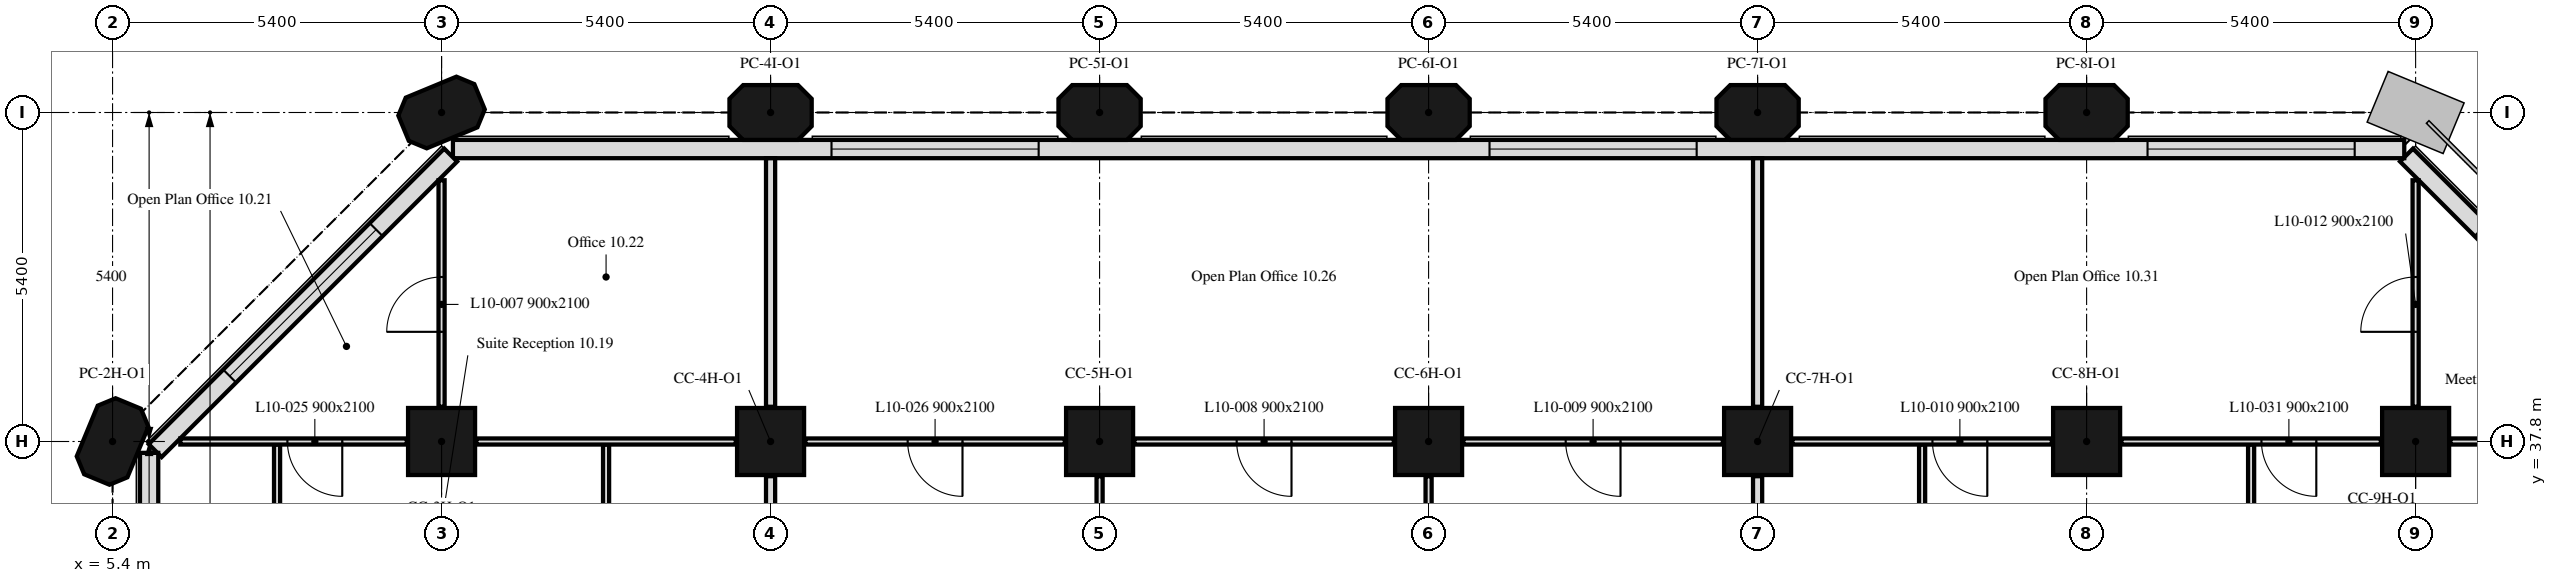
"""IFC4 building model, lengths in metres.
Left out: names, types, materials, properties, quantities, classifications, styles, units other than length and angle.
Written with IfcOpenShell. Run it as: python <this file> out.ifc"""

import sys

from ifc_helpers import new_model, si_unit, direction, frame, frame_2d, origin, origin_2d, place, context, subcontext, project, spatial, polyline, rectangle, outline, extrude, element, fill, save


model = new_model("IFC4")
c1 = context("Model", 3, precision=1e-05, world=origin(), true_north=direction((0.0, 1.0)))
c2 = subcontext(c1, "Body", "Model", "MODEL_VIEW")
j1 = project(units=[si_unit("LENGTHUNIT", "METRE"), si_unit("PLANEANGLEUNIT", "RADIAN")], contexts=[c1])
p1 = place(None, origin())
s1 = spatial("IfcSite", under=j1, at=p1, CompositionType="ELEMENT")
p2 = place(p1, origin())
s2 = spatial("IfcBuilding", under=s1, at=p2, CompositionType="ELEMENT")
p3 = place(p2, frame((0.0, 0.0, 48.8)))
s3 = spatial("IfcBuildingStorey", under=s2, at=p3, CompositionType="ELEMENT", Elevation=48.8)
p4 = place(p3, frame((5.4, 37.8, 0.0), z_axis=(0.0, 0.0, 1.0), x_axis=(0.382683432365, 0.923879532511, 0.0)))
e1 = element("IfcColumn", 1, at=p4, inside=s3, PredefinedType="COLUMN", context=c2, shape_type="SweptSolid", body=[
    extrude(outline(polyline([(-0.45, -0.45), (0.45, -0.45), (0.675, -0.225), (0.675, 0.225), (0.45, 0.45), (-0.45, 0.45), (-0.675, 0.225), (-0.675, -0.225), (-0.45, -0.45)])), origin(), (0.0, 0.0, 1.0), 3.5),
])
for number, where, z_axis, x_axis in (
    (2, (10.8, 37.8, 0.0), (0.0, 0.0, 1.0), (1.0, 0.0, 0.0)),
    (3, (16.2, 37.8, 0.0), (0.0, 0.0, 1.0), (1.0, 0.0, 0.0)),
    (4, (21.6, 37.8, 0.0), (0.0, 0.0, 1.0), (1.0, 0.0, 0.0)),
    (5, (27.0, 37.8, 0.0), (0.0, 0.0, 1.0), (1.0, 0.0, 0.0)),
    (6, (32.4, 37.8, 0.0), (0.0, 0.0, 1.0), (1.0, 0.0, 0.0)),
    (7, (37.8, 37.8, 0.0), (0.0, 0.0, 1.0), (1.0, 0.0, 0.0)),
    (8, (43.2, 37.8, 0.0), (0.0, 0.0, 1.0), (1.0, 0.0, 0.0)),
):
    element("IfcColumn", number, at=place(p3, frame(where, z_axis=z_axis, x_axis=x_axis)), inside=s3, PredefinedType="COLUMN", context=c2, shape_type="SweptSolid", body=[
        extrude(rectangle(XDim=1.1, YDim=1.1, at=origin_2d()), origin(), (0.0, 0.0, 1.0), 3.5),
    ])
for number, where, z_axis, x_axis in (
    (9, (10.8, 43.2, 0.0), (0.0, 0.0, 1.0), (0.924, 0.383, 0.0)),
    (10, (16.2, 43.2, 0.0), (0.0, 0.0, 1.0), (1.0, 0.0, 0.0)),
    (11, (21.6, 43.2, 0.0), (0.0, 0.0, 1.0), (1.0, 0.0, 0.0)),
    (12, (27.0, 43.2, 0.0), (0.0, 0.0, 1.0), (1.0, 0.0, 0.0)),
    (13, (32.4, 43.2, 0.0), (0.0, 0.0, 1.0), (1.0, 0.0, 0.0)),
    (14, (37.8, 43.2, 0.0), (0.0, 0.0, 1.0), (1.0, 0.0, 0.0)),
):
    element("IfcColumn", number, at=place(p3, frame(where, z_axis=z_axis, x_axis=x_axis)), inside=s3, PredefinedType="COLUMN", context=c2, shape_type="SweptSolid", body=[
        extrude(outline(polyline([(-0.45, -0.45), (0.45, -0.45), (0.675, -0.225), (0.675, 0.225), (0.45, 0.45), (-0.45, 0.45), (-0.675, 0.225), (-0.675, -0.225), (-0.45, -0.45)])), origin(), (0.0, 0.0, 1.0), 3.5),
    ])
p5 = place(p3, frame((47.901, 37.65, 0.0), z_axis=(0.0, 0.0, 1.0), x_axis=(-0.707106781187, 0.707106781187, 0.0)))
e15 = element("IfcWall", 15, at=p5, inside=s3, PredefinedType="SOLIDWALL", context=c2, shape_type="SweptSolid", body=[
    extrude(rectangle(XDim=6.86, YDim=0.3, at=frame_2d((3.43, 0.0))), origin(), (0.0, 0.0, 1.0), 3.5),
])
p6 = place(p5, frame((1.73, 0.0, 0.9)))
e16 = element("IfcOpeningElement", 16, at=p6, cuts=e15, PredefinedType="OPENING", context=c2, shape_type="SweptSolid", body=[
    extrude(rectangle(XDim=3.4, YDim=1.7, at=frame_2d((1.7, 0.85))), frame((0.0, 0.16, 0.0), z_axis=(0.0, -1.0, 0.0), x_axis=(1.0, 0.0, 0.0)), (0.0, 0.0, 1.0), 0.32),
])
p7 = place(p3, frame((43.014, 42.6, 0.0), z_axis=(0.0, 0.0, 1.0), x_axis=(-1.0, 0.0, 0.0)))
e17 = element("IfcWall", 17, at=p7, inside=s3, PredefinedType="SOLIDWALL", context=c2, shape_type="SweptSolid", body=[
    extrude(rectangle(XDim=32.027, YDim=0.3, at=frame_2d((16.014, 0.0))), origin(), (0.0, 0.0, 1.0), 3.5),
])
p8 = place(p7, frame((0.814, 0.0, 0.9)))
e18 = element("IfcOpeningElement", 18, at=p8, cuts=e17, PredefinedType="OPENING", context=c2, shape_type="SweptSolid", body=[
    extrude(rectangle(XDim=3.4, YDim=1.7, at=frame_2d((1.7, 0.85))), frame((0.0, 0.16, 0.0), z_axis=(0.0, -1.0, 0.0), x_axis=(1.0, 0.0, 0.0)), (0.0, 0.0, 1.0), 0.32),
])
p9 = place(p7, frame((11.614, 0.0, 0.9)))
e19 = element("IfcOpeningElement", 19, at=p9, cuts=e17, PredefinedType="OPENING", context=c2, shape_type="SweptSolid", body=[
    extrude(rectangle(XDim=3.4, YDim=1.7, at=frame_2d((1.7, 0.85))), frame((0.0, 0.16, 0.0), z_axis=(0.0, -1.0, 0.0), x_axis=(1.0, 0.0, 0.0)), (0.0, 0.0, 1.0), 0.32),
])
p10 = place(p7, frame((22.414, 0.0, 0.9)))
e20 = element("IfcOpeningElement", 20, at=p10, cuts=e17, PredefinedType="OPENING", context=c2, shape_type="SweptSolid", body=[
    extrude(rectangle(XDim=3.4, YDim=1.7, at=frame_2d((1.7, 0.85))), frame((0.0, 0.16, 0.0), z_axis=(0.0, -1.0, 0.0), x_axis=(1.0, 0.0, 0.0)), (0.0, 0.0, 1.0), 0.32),
])
p11 = place(p3, frame((10.949, 42.501, 0.0), z_axis=(0.0, 0.0, 1.0), x_axis=(-0.707106781187, -0.707106781187, 0.0)))
e21 = element("IfcWall", 21, at=p11, inside=s3, PredefinedType="SOLIDWALL", context=c2, shape_type="SweptSolid", body=[
    extrude(rectangle(XDim=6.86, YDim=0.3, at=frame_2d((3.43, 0.0))), origin(), (0.0, 0.0, 1.0), 3.5),
])
p12 = place(p11, frame((1.73, 0.0, 0.9)))
e22 = element("IfcOpeningElement", 22, at=p12, cuts=e21, PredefinedType="OPENING", context=c2, shape_type="SweptSolid", body=[
    extrude(rectangle(XDim=3.4, YDim=1.7, at=frame_2d((1.7, 0.85))), frame((0.0, 0.16, 0.0), z_axis=(0.0, -1.0, 0.0), x_axis=(1.0, 0.0, 0.0)), (0.0, 0.0, 1.0), 0.32),
])
p13 = place(p3, frame((6.0, 37.614, 0.0), z_axis=(0.0, 0.0, 1.0), x_axis=(0.0, -1.0, 0.0)))
e23 = element("IfcWall", 23, at=p13, inside=s3, PredefinedType="SOLIDWALL", context=c2, shape_type="SweptSolid", body=[
    extrude(rectangle(XDim=5.214, YDim=0.3, at=frame_2d((2.607, 0.0))), origin(), (0.0, 0.0, 1.0), 3.5),
])
p14 = place(p13, frame((1.164, 0.0, 0.9)))
e24 = element("IfcOpeningElement", 24, at=p14, cuts=e23, PredefinedType="OPENING", context=c2, shape_type="SweptSolid", body=[
    extrude(rectangle(XDim=1.1, YDim=1.7, at=frame_2d((0.55, 0.85))), frame((0.0, 0.16, 0.0), z_axis=(0.0, -1.0, 0.0), x_axis=(1.0, 0.0, 0.0)), (0.0, 0.0, 1.0), 0.32),
])
p15 = place(p13, frame((2.764, 0.0, 0.9)))
e25 = element("IfcOpeningElement", 25, at=p15, cuts=e23, PredefinedType="OPENING", context=c2, shape_type="SweptSolid", body=[
    extrude(rectangle(XDim=1.1, YDim=1.7, at=frame_2d((0.55, 0.85))), frame((0.0, 0.16, 0.0), z_axis=(0.0, -1.0, 0.0), x_axis=(1.0, 0.0, 0.0)), (0.0, 0.0, 1.0), 0.32),
])
p16 = place(p3, frame((8.1, 35.175, 0.0), z_axis=(0.0, 0.0, 1.0), x_axis=(0.0, 1.0, 0.0)))
e26 = element("IfcWall", 26, at=p16, inside=s3, PredefinedType="PARTITIONING", context=c2, shape_type="SweptSolid", body=[
    extrude(rectangle(XDim=2.575, YDim=0.1, at=frame_2d((1.288, 0.0))), origin(), (0.0, 0.0, 1.0), 3.5),
])
p17 = place(p3, frame((13.5, 35.175, 0.0), z_axis=(0.0, 0.0, 1.0), x_axis=(0.0, 1.0, 0.0)))
e27 = element("IfcWall", 27, at=p17, inside=s3, PredefinedType="PARTITIONING", context=c2, shape_type="SweptSolid", body=[
    extrude(rectangle(XDim=2.575, YDim=0.1, at=frame_2d((1.288, 0.0))), origin(), (0.0, 0.0, 1.0), 3.5),
])
p18 = place(p17, frame((0.25, 0.0, 0.0)))
e28 = element("IfcOpeningElement", 28, at=p18, cuts=e27, PredefinedType="OPENING", context=c2, shape_type="SweptSolid", body=[
    extrude(rectangle(XDim=0.9, YDim=2.1, at=frame_2d((0.45, 1.05))), frame((0.0, 0.05, 0.0), z_axis=(0.0, -1.0, 0.0), x_axis=(1.0, 0.0, 0.0)), (0.0, 0.0, 1.0), 0.1),
])
p19 = place(p3, frame((10.23, 37.8, 0.0), z_axis=(0.0, 0.0, 1.0), x_axis=(-1.0, 0.0, 0.0)))
e29 = element("IfcWall", 29, at=p19, inside=s3, PredefinedType="PARTITIONING", context=c2, shape_type="SweptSolid", body=[
    extrude(rectangle(XDim=3.718, YDim=0.1, at=frame_2d((1.859, 0.0))), origin(), (0.0, 0.0, 1.0), 3.5),
])
p20 = place(p19, frame((1.06, 0.0, 0.0)))
e30 = element("IfcOpeningElement", 30, at=p20, cuts=e29, PredefinedType="OPENING", context=c2, shape_type="SweptSolid", body=[
    extrude(rectangle(XDim=0.9, YDim=2.1, at=frame_2d((0.45, 1.05))), frame((0.0, 0.05, 0.0), z_axis=(0.0, -1.0, 0.0), x_axis=(1.0, 0.0, 0.0)), (0.0, 0.0, 1.0), 0.1),
])
p21 = place(p3, frame((16.2, 35.175, 0.0), z_axis=(0.0, 0.0, 1.0), x_axis=(0.0, 1.0, 0.0)))
e31 = element("IfcWall", 31, at=p21, inside=s3, PredefinedType="PARTITIONING", context=c2, shape_type="SweptSolid", body=[
    extrude(rectangle(XDim=2.055, YDim=0.15, at=frame_2d((1.027, 0.0))), origin(), (0.0, 0.0, 1.0), 3.5),
])
p22 = place(p3, frame((15.63, 37.8, 0.0), z_axis=(0.0, 0.0, 1.0), x_axis=(-1.0, 0.0, 0.0)))
e32 = element("IfcWall", 32, at=p22, inside=s3, PredefinedType="PARTITIONING", context=c2, shape_type="SweptSolid", body=[
    extrude(rectangle(XDim=4.26, YDim=0.1, at=frame_2d((2.13, 0.0))), origin(), (0.0, 0.0, 1.0), 3.5),
])
p23 = place(p3, frame((10.8, 38.37, 0.0), z_axis=(0.0, 0.0, 1.0), x_axis=(0.0, 1.0, 0.0)))
e33 = element("IfcWall", 33, at=p23, inside=s3, PredefinedType="PARTITIONING", context=c2, shape_type="SweptSolid", body=[
    extrude(rectangle(XDim=3.718, YDim=0.1, at=frame_2d((1.859, 0.0))), origin(), (0.0, 0.0, 1.0), 3.5),
])
p24 = place(p23, frame((1.23, 0.0, 0.0)))
e34 = element("IfcOpeningElement", 34, at=p24, cuts=e33, PredefinedType="OPENING", context=c2, shape_type="SweptSolid", body=[
    extrude(rectangle(XDim=0.9, YDim=2.1, at=frame_2d((0.45, 1.05))), frame((0.0, 0.05, 0.0), z_axis=(0.0, -1.0, 0.0), x_axis=(1.0, 0.0, 0.0)), (0.0, 0.0, 1.0), 0.1),
])
p25 = place(p3, frame((16.2, 38.37, 0.0), z_axis=(0.0, 0.0, 1.0), x_axis=(0.0, 1.0, 0.0)))
e35 = element("IfcWall", 35, at=p25, inside=s3, PredefinedType="PARTITIONING", context=c2, shape_type="SweptSolid", body=[
    extrude(rectangle(XDim=4.079, YDim=0.15, at=frame_2d((2.04, 0.0))), origin(), (0.0, 0.0, 1.0), 3.5),
])
p26 = place(p3, frame((21.6, 35.175, 0.0), z_axis=(0.0, 0.0, 1.0), x_axis=(0.0, 1.0, 0.0)))
e36 = element("IfcWall", 36, at=p26, inside=s3, PredefinedType="PARTITIONING", context=c2, shape_type="SweptSolid", body=[
    extrude(rectangle(XDim=2.055, YDim=0.1, at=frame_2d((1.027, 0.0))), origin(), (0.0, 0.0, 1.0), 3.5),
])
p27 = place(p3, frame((21.03, 37.8, 0.0), z_axis=(0.0, 0.0, 1.0), x_axis=(-1.0, 0.0, 0.0)))
e37 = element("IfcWall", 37, at=p27, inside=s3, PredefinedType="PARTITIONING", context=c2, shape_type="SweptSolid", body=[
    extrude(rectangle(XDim=4.26, YDim=0.1, at=frame_2d((2.13, 0.0))), origin(), (0.0, 0.0, 1.0), 3.5),
])
p28 = place(p27, frame((1.68, 0.0, 0.0)))
e38 = element("IfcOpeningElement", 38, at=p28, cuts=e37, PredefinedType="OPENING", context=c2, shape_type="SweptSolid", body=[
    extrude(rectangle(XDim=0.9, YDim=2.1, at=frame_2d((0.45, 1.05))), frame((0.0, 0.05, 0.0), z_axis=(0.0, -1.0, 0.0), x_axis=(1.0, 0.0, 0.0)), (0.0, 0.0, 1.0), 0.1),
])
p29 = place(p3, frame((27.0, 35.175, 0.0), z_axis=(0.0, 0.0, 1.0), x_axis=(0.0, 1.0, 0.0)))
e39 = element("IfcWall", 39, at=p29, inside=s3, PredefinedType="PARTITIONING", context=c2, shape_type="SweptSolid", body=[
    extrude(rectangle(XDim=2.055, YDim=0.1, at=frame_2d((1.027, 0.0))), origin(), (0.0, 0.0, 1.0), 3.5),
])
p30 = place(p3, frame((26.43, 37.8, 0.0), z_axis=(0.0, 0.0, 1.0), x_axis=(-1.0, 0.0, 0.0)))
e40 = element("IfcWall", 40, at=p30, inside=s3, PredefinedType="PARTITIONING", context=c2, shape_type="SweptSolid", body=[
    extrude(rectangle(XDim=4.26, YDim=0.1, at=frame_2d((2.13, 0.0))), origin(), (0.0, 0.0, 1.0), 3.5),
])
p31 = place(p30, frame((1.68, 0.0, 0.0)))
e41 = element("IfcOpeningElement", 41, at=p31, cuts=e40, PredefinedType="OPENING", context=c2, shape_type="SweptSolid", body=[
    extrude(rectangle(XDim=0.9, YDim=2.1, at=frame_2d((0.45, 1.05))), frame((0.0, 0.05, 0.0), z_axis=(0.0, -1.0, 0.0), x_axis=(1.0, 0.0, 0.0)), (0.0, 0.0, 1.0), 0.1),
])
p32 = place(p3, frame((32.4, 35.175, 0.0), z_axis=(0.0, 0.0, 1.0), x_axis=(0.0, 1.0, 0.0)))
e42 = element("IfcWall", 42, at=p32, inside=s3, PredefinedType="PARTITIONING", context=c2, shape_type="SweptSolid", body=[
    extrude(rectangle(XDim=2.055, YDim=0.15, at=frame_2d((1.027, 0.0))), origin(), (0.0, 0.0, 1.0), 3.5),
])
p33 = place(p3, frame((31.83, 37.8, 0.0), z_axis=(0.0, 0.0, 1.0), x_axis=(-1.0, 0.0, 0.0)))
e43 = element("IfcWall", 43, at=p33, inside=s3, PredefinedType="PARTITIONING", context=c2, shape_type="SweptSolid", body=[
    extrude(rectangle(XDim=4.26, YDim=0.1, at=frame_2d((2.13, 0.0))), origin(), (0.0, 0.0, 1.0), 3.5),
])
p34 = place(p33, frame((1.68, 0.0, 0.0)))
e44 = element("IfcOpeningElement", 44, at=p34, cuts=e43, PredefinedType="OPENING", context=c2, shape_type="SweptSolid", body=[
    extrude(rectangle(XDim=0.9, YDim=2.1, at=frame_2d((0.45, 1.05))), frame((0.0, 0.05, 0.0), z_axis=(0.0, -1.0, 0.0), x_axis=(1.0, 0.0, 0.0)), (0.0, 0.0, 1.0), 0.1),
])
p35 = place(p3, frame((32.4, 38.37, 0.0), z_axis=(0.0, 0.0, 1.0), x_axis=(0.0, 1.0, 0.0)))
e45 = element("IfcWall", 45, at=p35, inside=s3, PredefinedType="PARTITIONING", context=c2, shape_type="SweptSolid", body=[
    extrude(rectangle(XDim=4.079, YDim=0.15, at=frame_2d((2.04, 0.0))), origin(), (0.0, 0.0, 1.0), 3.5),
])
for number, where, z_axis, x_axis in (
    (46, (35.1, 35.175, 0.0), (0.0, 0.0, 1.0), (0.0, 1.0, 0.0)),
    (47, (40.5, 35.175, 0.0), (0.0, 0.0, 1.0), (0.0, 1.0, 0.0)),
):
    element("IfcWall", number, at=place(p3, frame(where, z_axis=z_axis, x_axis=x_axis)), inside=s3, PredefinedType="PARTITIONING", context=c2, shape_type="SweptSolid", body=[
        extrude(rectangle(XDim=2.575, YDim=0.1, at=frame_2d((1.288, 0.0))), origin(), (0.0, 0.0, 1.0), 3.5),
    ])
p36 = place(p3, frame((37.23, 37.8, 0.0), z_axis=(0.0, 0.0, 1.0), x_axis=(-1.0, 0.0, 0.0)))
e48 = element("IfcWall", 48, at=p36, inside=s3, PredefinedType="PARTITIONING", context=c2, shape_type="SweptSolid", body=[
    extrude(rectangle(XDim=4.26, YDim=0.1, at=frame_2d((2.13, 0.0))), origin(), (0.0, 0.0, 1.0), 3.5),
])
p37 = place(p36, frame((1.06, 0.0, 0.0)))
e49 = element("IfcOpeningElement", 49, at=p37, cuts=e48, PredefinedType="OPENING", context=c2, shape_type="SweptSolid", body=[
    extrude(rectangle(XDim=0.9, YDim=2.1, at=frame_2d((0.45, 1.05))), frame((0.0, 0.05, 0.0), z_axis=(0.0, -1.0, 0.0), x_axis=(1.0, 0.0, 0.0)), (0.0, 0.0, 1.0), 0.1),
])
p38 = place(p3, frame((42.63, 37.8, 0.0), z_axis=(0.0, 0.0, 1.0), x_axis=(-1.0, 0.0, 0.0)))
e50 = element("IfcWall", 50, at=p38, inside=s3, PredefinedType="PARTITIONING", context=c2, shape_type="SweptSolid", body=[
    extrude(rectangle(XDim=4.26, YDim=0.1, at=frame_2d((2.13, 0.0))), origin(), (0.0, 0.0, 1.0), 3.5),
])
p39 = place(p38, frame((1.06, 0.0, 0.0)))
e51 = element("IfcOpeningElement", 51, at=p39, cuts=e50, PredefinedType="OPENING", context=c2, shape_type="SweptSolid", body=[
    extrude(rectangle(XDim=0.9, YDim=2.1, at=frame_2d((0.45, 1.05))), frame((0.0, 0.05, 0.0), z_axis=(0.0, -1.0, 0.0), x_axis=(1.0, 0.0, 0.0)), (0.0, 0.0, 1.0), 0.1),
])
p40 = place(p3, frame((47.488, 37.8, 0.0), z_axis=(0.0, 0.0, 1.0), x_axis=(-1.0, 0.0, 0.0)))
e52 = element("IfcWall", 52, at=p40, inside=s3, PredefinedType="PARTITIONING", context=c2, shape_type="SweptSolid", body=[
    extrude(rectangle(XDim=3.718, YDim=0.1, at=frame_2d((1.859, 0.0))), origin(), (0.0, 0.0, 1.0), 3.5),
])
p41 = place(p3, frame((43.2, 38.37, 0.0), z_axis=(0.0, 0.0, 1.0), x_axis=(0.0, 1.0, 0.0)))
e53 = element("IfcWall", 53, at=p41, inside=s3, PredefinedType="PARTITIONING", context=c2, shape_type="SweptSolid", body=[
    extrude(rectangle(XDim=3.718, YDim=0.1, at=frame_2d((1.859, 0.0))), origin(), (0.0, 0.0, 1.0), 3.5),
])
p42 = place(p41, frame((1.23, 0.0, 0.0)))
e54 = element("IfcOpeningElement", 54, at=p42, cuts=e53, PredefinedType="OPENING", context=c2, shape_type="SweptSolid", body=[
    extrude(rectangle(XDim=0.9, YDim=2.1, at=frame_2d((0.45, 1.05))), frame((0.0, 0.05, 0.0), z_axis=(0.0, -1.0, 0.0), x_axis=(1.0, 0.0, 0.0)), (0.0, 0.0, 1.0), 0.1),
])
p43 = place(p8, origin())
e55 = element("IfcWindow", 55, at=p43, inside=s3, PartitioningType="SINGLE_PANEL", PredefinedType="WINDOW", context=c2, shape_type="SweptSolid", body=[
    extrude(rectangle(XDim=3.4, YDim=1.7, at=frame_2d((1.7, 0.85))), frame((0.0, 0.03, 0.0), z_axis=(0.0, -1.0, 0.0), x_axis=(1.0, 0.0, 0.0)), (0.0, 0.0, 1.0), 0.06),
])
fill(e18, e55)
p44 = place(p9, origin())
e56 = element("IfcWindow", 56, at=p44, inside=s3, PartitioningType="SINGLE_PANEL", PredefinedType="WINDOW", context=c2, shape_type="SweptSolid", body=[
    extrude(rectangle(XDim=3.4, YDim=1.7, at=frame_2d((1.7, 0.85))), frame((0.0, 0.03, 0.0), z_axis=(0.0, -1.0, 0.0), x_axis=(1.0, 0.0, 0.0)), (0.0, 0.0, 1.0), 0.06),
])
fill(e19, e56)
p45 = place(p10, origin())
e57 = element("IfcWindow", 57, at=p45, inside=s3, PartitioningType="SINGLE_PANEL", PredefinedType="WINDOW", context=c2, shape_type="SweptSolid", body=[
    extrude(rectangle(XDim=3.4, YDim=1.7, at=frame_2d((1.7, 0.85))), frame((0.0, 0.03, 0.0), z_axis=(0.0, -1.0, 0.0), x_axis=(1.0, 0.0, 0.0)), (0.0, 0.0, 1.0), 0.06),
])
fill(e20, e57)
p46 = place(p12, origin())
e58 = element("IfcWindow", 58, at=p46, inside=s3, PartitioningType="SINGLE_PANEL", PredefinedType="WINDOW", context=c2, shape_type="SweptSolid", body=[
    extrude(rectangle(XDim=3.4, YDim=1.7, at=frame_2d((1.7, 0.85))), frame((0.0, 0.03, 0.0), z_axis=(0.0, -1.0, 0.0), x_axis=(1.0, 0.0, 0.0)), (0.0, 0.0, 1.0), 0.06),
])
fill(e22, e58)
p47 = place(p24, origin())
e59 = element("IfcDoor", 59, at=p47, inside=s3, OperationType="SINGLE_SWING_RIGHT", PredefinedType="DOOR", context=c2, shape_type="SweptSolid", body=[
    extrude(rectangle(XDim=0.9, YDim=2.1, at=frame_2d((0.45, 1.05))), frame((0.0, 0.025, 0.0), z_axis=(0.0, -1.0, 0.0), x_axis=(1.0, 0.0, 0.0)), (0.0, 0.0, 1.0), 0.05),
])
fill(e34, e59)
p48 = place(p31, origin())
e60 = element("IfcDoor", 60, at=p48, inside=s3, OperationType="SINGLE_SWING_RIGHT", PredefinedType="DOOR", context=c2, shape_type="SweptSolid", body=[
    extrude(rectangle(XDim=0.9, YDim=2.1, at=frame_2d((0.45, 1.05))), frame((0.0, 0.025, 0.0), z_axis=(0.0, -1.0, 0.0), x_axis=(1.0, 0.0, 0.0)), (0.0, 0.0, 1.0), 0.05),
])
fill(e41, e60)
p49 = place(p34, origin())
e61 = element("IfcDoor", 61, at=p49, inside=s3, OperationType="SINGLE_SWING_RIGHT", PredefinedType="DOOR", context=c2, shape_type="SweptSolid", body=[
    extrude(rectangle(XDim=0.9, YDim=2.1, at=frame_2d((0.45, 1.05))), frame((0.0, 0.025, 0.0), z_axis=(0.0, -1.0, 0.0), x_axis=(1.0, 0.0, 0.0)), (0.0, 0.0, 1.0), 0.05),
])
fill(e44, e61)
p50 = place(p37, origin())
e62 = element("IfcDoor", 62, at=p50, inside=s3, OperationType="SINGLE_SWING_LEFT", PredefinedType="DOOR", context=c2, shape_type="SweptSolid", body=[
    extrude(rectangle(XDim=0.9, YDim=2.1, at=frame_2d((0.45, 1.05))), frame((0.0, 0.025, 0.0), z_axis=(0.0, -1.0, 0.0), x_axis=(1.0, 0.0, 0.0)), (0.0, 0.0, 1.0), 0.05),
])
fill(e49, e62)
p51 = place(p42, origin())
e63 = element("IfcDoor", 63, at=p51, inside=s3, OperationType="SINGLE_SWING_RIGHT", PredefinedType="DOOR", context=c2, shape_type="SweptSolid", body=[
    extrude(rectangle(XDim=0.9, YDim=2.1, at=frame_2d((0.45, 1.05))), frame((0.0, 0.025, 0.0), z_axis=(0.0, -1.0, 0.0), x_axis=(1.0, 0.0, 0.0)), (0.0, 0.0, 1.0), 0.05),
])
fill(e54, e63)
p52 = place(p20, origin())
e64 = element("IfcDoor", 64, at=p52, inside=s3, OperationType="SINGLE_SWING_LEFT", PredefinedType="DOOR", context=c2, shape_type="SweptSolid", body=[
    extrude(rectangle(XDim=0.9, YDim=2.1, at=frame_2d((0.45, 1.05))), frame((0.0, 0.025, 0.0), z_axis=(0.0, -1.0, 0.0), x_axis=(1.0, 0.0, 0.0)), (0.0, 0.0, 1.0), 0.05),
])
fill(e30, e64)
p53 = place(p28, origin())
e65 = element("IfcDoor", 65, at=p53, inside=s3, OperationType="SINGLE_SWING_LEFT", PredefinedType="DOOR", context=c2, shape_type="SweptSolid", body=[
    extrude(rectangle(XDim=0.9, YDim=2.1, at=frame_2d((0.45, 1.05))), frame((0.0, 0.025, 0.0), z_axis=(0.0, -1.0, 0.0), x_axis=(1.0, 0.0, 0.0)), (0.0, 0.0, 1.0), 0.05),
])
fill(e38, e65)
p54 = place(p39, origin())
e66 = element("IfcDoor", 66, at=p54, inside=s3, OperationType="SINGLE_SWING_LEFT", PredefinedType="DOOR", context=c2, shape_type="SweptSolid", body=[
    extrude(rectangle(XDim=0.9, YDim=2.1, at=frame_2d((0.45, 1.05))), frame((0.0, 0.025, 0.0), z_axis=(0.0, -1.0, 0.0), x_axis=(1.0, 0.0, 0.0)), (0.0, 0.0, 1.0), 0.05),
])
fill(e51, e66)
save(model, sys.argv[1])
